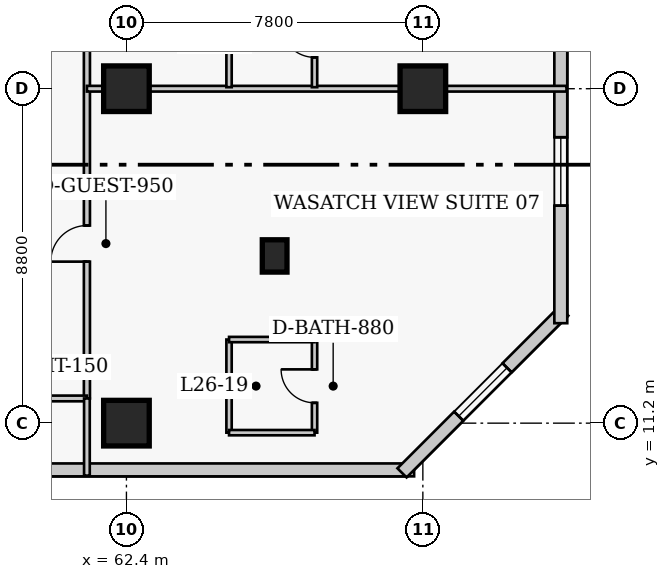
"""IFC4 building model, lengths in metres.
Left out: names, types, materials, properties, quantities, classifications, styles, units other than length and angle.
Written with IfcOpenShell. Run it as: python <this file> out.ifc"""

import sys

from ifc_helpers import new_model, si_unit, direction, frame, frame_2d, origin, origin_2d, place, context, subcontext, project, spatial, rectangle, extrude, element, fill, save


model = new_model("IFC4")
c1 = context("Model", 3, precision=1e-05, world=origin(), true_north=direction((0.0, 1.0)))
c2 = subcontext(c1, "Body", "Model", "MODEL_VIEW")
j1 = project(units=[si_unit("LENGTHUNIT", "METRE"), si_unit("PLANEANGLEUNIT", "RADIAN")], contexts=[c1])
p1 = place(None, origin())
s1 = spatial("IfcSite", under=j1, at=p1, CompositionType="ELEMENT")
p2 = place(p1, origin())
s2 = spatial("IfcBuilding", under=s1, at=p2, CompositionType="ELEMENT")
p3 = place(p2, frame((0.0, 0.0, 107.0)))
s3 = spatial("IfcBuildingStorey", under=s2, at=p3, CompositionType="ELEMENT", Elevation=107.0)
for number, where, z_axis, x_axis in (
    (1, (62.4, 11.2, 0.0), (0.0, 0.0, 1.0), (1.0, 0.0, 0.0)),
    (2, (62.4, 20.0, 0.0), (0.0, 0.0, 1.0), (1.0, 0.0, 0.0)),
    (3, (70.2, 20.0, 0.0), (0.0, 0.0, 1.0), (1.0, 0.0, 0.0)),
):
    element("IfcColumn", number, at=place(p3, frame(where, z_axis=z_axis, x_axis=x_axis)), inside=s3, PredefinedType="COLUMN", context=c2, shape_type="SweptSolid", body=[
        extrude(rectangle(XDim=1.2, YDim=1.2, at=origin_2d()), origin(), (0.0, 0.0, 1.0), 3.8),
    ])
p4 = place(p3, frame((66.3, 15.6, 0.0), z_axis=(0.0, 0.0, 1.0), x_axis=(1.0, 0.0, 0.0)))
e4 = element("IfcColumn", 4, at=p4, inside=s3, PredefinedType="PILASTER", context=c2, shape_type="SweptSolid", body=[
    extrude(rectangle(XDim=0.65, YDim=0.85, at=origin_2d()), origin(), (0.0, 0.0, 1.0), 3.8),
])
p5 = place(p3, frame((41.68, 9.97, 0.0), z_axis=(0.0, 0.0, 1.0), x_axis=(1.0, 0.0, 0.0)))
e5 = element("IfcWall", 5, at=p5, inside=s3, PredefinedType="SOLIDWALL", context=c2, shape_type="SweptSolid", body=[
    extrude(rectangle(XDim=28.29, YDim=0.34, at=frame_2d((14.145, 0.0))), origin(), (0.0, 0.0, 1.0), 3.54),
])
p6 = place(p5, frame((8.32, 0.0, 0.0)))
e6 = element("IfcOpeningElement", 6, at=p6, cuts=e5, PredefinedType="OPENING", context=c2, shape_type="SweptSolid", body=[
    extrude(rectangle(XDim=1.4, YDim=2.15, at=frame_2d((0.7, 1.075))), frame((0.0, 0.18, 0.0), z_axis=(0.0, -1.0, 0.0), x_axis=(1.0, 0.0, 0.0)), (0.0, 0.0, 1.0), 0.36),
])
p7 = place(p5, frame((2.665, 0.0, 0.85)))
e7 = element("IfcOpeningElement", 7, at=p7, cuts=e5, PredefinedType="OPENING", context=c2, shape_type="SweptSolid", body=[
    extrude(rectangle(XDim=1.8, YDim=1.8, at=frame_2d((0.9, 0.9))), frame((0.0, 0.18, 0.0), z_axis=(0.0, -1.0, 0.0), x_axis=(1.0, 0.0, 0.0)), (0.0, 0.0, 1.0), 0.36),
])
p8 = place(p5, frame((13.895, 0.0, 0.85)))
e8 = element("IfcOpeningElement", 8, at=p8, cuts=e5, PredefinedType="OPENING", context=c2, shape_type="SweptSolid", body=[
    extrude(rectangle(XDim=1.8, YDim=1.8, at=frame_2d((0.9, 0.9))), frame((0.0, 0.18, 0.0), z_axis=(0.0, -1.0, 0.0), x_axis=(1.0, 0.0, 0.0)), (0.0, 0.0, 1.0), 0.36),
])
p9 = place(p3, frame((69.652, 9.892, 0.0), z_axis=(0.0, 0.0, 1.0), x_axis=(0.707106781187, 0.707106781187, 0.0)))
e9 = element("IfcWall", 9, at=p9, inside=s3, PredefinedType="SOLIDWALL", context=c2, shape_type="SweptSolid", body=[
    extrude(rectangle(XDim=6.02, YDim=0.34, at=frame_2d((3.01, 0.0))), origin(), (0.0, 0.0, 1.0), 3.54),
])
p10 = place(p9, frame((2.11, 0.0, 0.85)))
e10 = element("IfcOpeningElement", 10, at=p10, cuts=e9, PredefinedType="OPENING", context=c2, shape_type="SweptSolid", body=[
    extrude(rectangle(XDim=1.8, YDim=1.8, at=frame_2d((0.9, 0.9))), frame((0.0, 0.18, 0.0), z_axis=(0.0, -1.0, 0.0), x_axis=(1.0, 0.0, 0.0)), (0.0, 0.0, 1.0), 0.36),
])
p11 = place(p3, frame((73.83, 13.83, 0.0), z_axis=(0.0, 0.0, 1.0), x_axis=(0.0, 1.0, 0.0)))
e11 = element("IfcWall", 11, at=p11, inside=s3, PredefinedType="SOLIDWALL", context=c2, shape_type="SweptSolid", body=[
    extrude(rectangle(XDim=31.94, YDim=0.34, at=frame_2d((15.97, 0.0))), origin(), (0.0, 0.0, 1.0), 3.54),
])
p12 = place(p11, frame((3.093, 0.0, 0.85)))
e12 = element("IfcOpeningElement", 12, at=p12, cuts=e11, PredefinedType="OPENING", context=c2, shape_type="SweptSolid", body=[
    extrude(rectangle(XDim=1.8, YDim=1.8, at=frame_2d((0.9, 0.9))), frame((0.0, 0.18, 0.0), z_axis=(0.0, -1.0, 0.0), x_axis=(1.0, 0.0, 0.0)), (0.0, 0.0, 1.0), 0.36),
])
p13 = place(p11, frame((11.077, 0.0, 0.85)))
e13 = element("IfcOpeningElement", 13, at=p13, cuts=e11, PredefinedType="OPENING", context=c2, shape_type="SweptSolid", body=[
    extrude(rectangle(XDim=1.8, YDim=1.8, at=frame_2d((0.9, 0.9))), frame((0.0, 0.18, 0.0), z_axis=(0.0, -1.0, 0.0), x_axis=(1.0, 0.0, 0.0)), (0.0, 0.0, 1.0), 0.36),
])
p14 = place(p11, frame((19.062, 0.0, 0.85)))
e14 = element("IfcOpeningElement", 14, at=p14, cuts=e11, PredefinedType="OPENING", context=c2, shape_type="SweptSolid", body=[
    extrude(rectangle(XDim=1.8, YDim=1.8, at=frame_2d((0.9, 0.9))), frame((0.0, 0.18, 0.0), z_axis=(0.0, -1.0, 0.0), x_axis=(1.0, 0.0, 0.0)), (0.0, 0.0, 1.0), 0.36),
])
p15 = place(p11, frame((27.048, 0.0, 0.85)))
e15 = element("IfcOpeningElement", 15, at=p15, cuts=e11, PredefinedType="OPENING", context=c2, shape_type="SweptSolid", body=[
    extrude(rectangle(XDim=1.8, YDim=1.8, at=frame_2d((0.9, 0.9))), frame((0.0, 0.18, 0.0), z_axis=(0.0, -1.0, 0.0), x_axis=(1.0, 0.0, 0.0)), (0.0, 0.0, 1.0), 0.36),
])
p16 = place(p3, frame((61.36, 11.85, 0.0), z_axis=(0.0, 0.0, 1.0), x_axis=(0.0, 1.0, 0.0)))
e16 = element("IfcWall", 16, at=p16, inside=s3, PredefinedType="PARTITIONING", context=c2, shape_type="SweptSolid", body=[
    extrude(rectangle(XDim=28.8, YDim=0.16, at=frame_2d((14.4, 0.0))), origin(), (0.0, 0.0, 1.0), 3.54),
])
p17 = place(p16, frame((3.6, 0.0, 0.0)))
e17 = element("IfcOpeningElement", 17, at=p17, cuts=e16, PredefinedType="OPENING", context=c2, shape_type="SweptSolid", body=[
    extrude(rectangle(XDim=0.95, YDim=2.1, at=frame_2d((0.475, 1.05))), frame((0.0, 0.09, 0.0), z_axis=(0.0, -1.0, 0.0), x_axis=(1.0, 0.0, 0.0)), (0.0, 0.0, 1.0), 0.18),
])
p18 = place(p16, frame((12.075, 0.0, 0.0)))
e18 = element("IfcOpeningElement", 18, at=p18, cuts=e16, PredefinedType="OPENING", context=c2, shape_type="SweptSolid", body=[
    extrude(rectangle(XDim=0.95, YDim=2.1, at=frame_2d((0.475, 1.05))), frame((0.0, 0.09, 0.0), z_axis=(0.0, -1.0, 0.0), x_axis=(1.0, 0.0, 0.0)), (0.0, 0.0, 1.0), 0.18),
])
p19 = place(p16, frame((19.875, 0.0, 0.0)))
e19 = element("IfcOpeningElement", 19, at=p19, cuts=e16, PredefinedType="OPENING", context=c2, shape_type="SweptSolid", body=[
    extrude(rectangle(XDim=0.95, YDim=2.1, at=frame_2d((0.475, 1.05))), frame((0.0, 0.09, 0.0), z_axis=(0.0, -1.0, 0.0), x_axis=(1.0, 0.0, 0.0)), (0.0, 0.0, 1.0), 0.18),
])
p20 = place(p16, frame((24.3, 0.0, 0.0)))
e20 = element("IfcOpeningElement", 20, at=p20, cuts=e16, PredefinedType="OPENING", context=c2, shape_type="SweptSolid", body=[
    extrude(rectangle(XDim=1.0, YDim=2.15, at=frame_2d((0.5, 1.075))), frame((0.0, 0.09, 0.0), z_axis=(0.0, -1.0, 0.0), x_axis=(1.0, 0.0, 0.0)), (0.0, 0.0, 1.0), 0.18),
])
p21 = place(p3, frame((59.14, 11.85, 0.0), z_axis=(0.0, 0.0, 1.0), x_axis=(1.0, 0.0, 0.0)))
e21 = element("IfcWall", 21, at=p21, inside=s3, PredefinedType="PARTITIONING", context=c2, shape_type="SweptSolid", body=[
    extrude(rectangle(XDim=2.22, YDim=0.15, at=frame_2d((1.11, 0.0))), origin(), (0.0, 0.0, 1.0), 3.54),
])
p22 = place(p3, frame((61.36, 9.82, 0.0), z_axis=(0.0, 0.0, 1.0), x_axis=(0.0, 1.0, 0.0)))
e22 = element("IfcWall", 22, at=p22, inside=s3, PredefinedType="PARTITIONING", context=c2, shape_type="SweptSolid", body=[
    extrude(rectangle(XDim=2.03, YDim=0.15, at=frame_2d((1.015, 0.0))), origin(), (0.0, 0.0, 1.0), 3.54),
])
p23 = place(p3, frame((65.1, 10.95, 0.0), z_axis=(0.0, 0.0, 1.0), x_axis=(0.0, 1.0, 0.0)))
e23 = element("IfcWall", 23, at=p23, inside=s3, PredefinedType="PLUMBINGWALL", context=c2, shape_type="SweptSolid", body=[
    extrude(rectangle(XDim=2.45, YDim=0.14, at=frame_2d((1.225, 0.0))), origin(), (0.0, 0.0, 1.0), 3.54),
])
p24 = place(p3, frame((67.35, 10.95, 0.0), z_axis=(0.0, 0.0, 1.0), x_axis=(0.0, 1.0, 0.0)))
e24 = element("IfcWall", 24, at=p24, inside=s3, PredefinedType="PLUMBINGWALL", context=c2, shape_type="SweptSolid", body=[
    extrude(rectangle(XDim=2.45, YDim=0.14, at=frame_2d((1.225, 0.0))), origin(), (0.0, 0.0, 1.0), 3.54),
])
p25 = place(p24, frame((0.785, 0.0, 0.0)))
e25 = element("IfcOpeningElement", 25, at=p25, cuts=e24, PredefinedType="OPENING", context=c2, shape_type="SweptSolid", body=[
    extrude(rectangle(XDim=0.88, YDim=2.05, at=frame_2d((0.44, 1.025))), frame((0.0, 0.08, 0.0), z_axis=(0.0, -1.0, 0.0), x_axis=(1.0, 0.0, 0.0)), (0.0, 0.0, 1.0), 0.16),
])
for number, where, z_axis, x_axis in (
    (26, (65.1, 10.95, 0.0), (0.0, 0.0, 1.0), (1.0, 0.0, 0.0)),
    (27, (65.1, 13.4, 0.0), (0.0, 0.0, 1.0), (1.0, 0.0, 0.0)),
):
    element("IfcWall", number, at=place(p3, frame(where, z_axis=z_axis, x_axis=x_axis)), inside=s3, PredefinedType="PLUMBINGWALL", context=c2, shape_type="SweptSolid", body=[
        extrude(rectangle(XDim=2.25, YDim=0.14, at=frame_2d((1.125, 0.0))), origin(), (0.0, 0.0, 1.0), 3.54),
    ])
p26 = place(p3, frame((61.36, 20.0, 0.0), z_axis=(0.0, 0.0, 1.0), x_axis=(1.0, 0.0, 0.0)))
e28 = element("IfcWall", 28, at=p26, inside=s3, PredefinedType="PARTITIONING", context=c2, shape_type="SweptSolid", body=[
    extrude(rectangle(XDim=12.62, YDim=0.15, at=frame_2d((6.31, 0.0))), origin(), (0.0, 0.0, 1.0), 2.679),
])
p27 = place(p3, frame((65.1, 20.04, 0.0), z_axis=(0.0, 0.0, 1.0), x_axis=(0.0, 1.0, 0.0)))
e29 = element("IfcWall", 29, at=p27, inside=s3, PredefinedType="PLUMBINGWALL", context=c2, shape_type="SweptSolid", body=[
    extrude(rectangle(XDim=2.45, YDim=0.14, at=frame_2d((1.225, 0.0))), origin(), (0.0, 0.0, 1.0), 3.54),
])
p28 = place(p3, frame((67.35, 20.04, 0.0), z_axis=(0.0, 0.0, 1.0), x_axis=(0.0, 1.0, 0.0)))
e30 = element("IfcWall", 30, at=p28, inside=s3, PredefinedType="PLUMBINGWALL", context=c2, shape_type="SweptSolid", body=[
    extrude(rectangle(XDim=2.45, YDim=0.14, at=frame_2d((1.225, 0.0))), origin(), (0.0, 0.0, 1.0), 3.54),
])
p29 = place(p28, frame((0.785, 0.0, 0.0)))
e31 = element("IfcOpeningElement", 31, at=p29, cuts=e30, PredefinedType="OPENING", context=c2, shape_type="SweptSolid", body=[
    extrude(rectangle(XDim=0.88, YDim=2.05, at=frame_2d((0.44, 1.025))), frame((0.0, 0.08, 0.0), z_axis=(0.0, -1.0, 0.0), x_axis=(1.0, 0.0, 0.0)), (0.0, 0.0, 1.0), 0.16),
])
p30 = place(p10, origin())
e32 = element("IfcWindow", 32, at=p30, inside=s3, PartitioningType="SINGLE_PANEL", PredefinedType="WINDOW", context=c2, shape_type="SweptSolid", body=[
    extrude(rectangle(XDim=1.8, YDim=1.8, at=frame_2d((0.9, 0.9))), frame((0.0, 0.03, 0.0), z_axis=(0.0, -1.0, 0.0), x_axis=(1.0, 0.0, 0.0)), (0.0, 0.0, 1.0), 0.06),
])
fill(e10, e32)
p31 = place(p12, origin())
e33 = element("IfcWindow", 33, at=p31, inside=s3, PartitioningType="SINGLE_PANEL", PredefinedType="WINDOW", context=c2, shape_type="SweptSolid", body=[
    extrude(rectangle(XDim=1.8, YDim=1.8, at=frame_2d((0.9, 0.9))), frame((0.0, 0.03, 0.0), z_axis=(0.0, -1.0, 0.0), x_axis=(1.0, 0.0, 0.0)), (0.0, 0.0, 1.0), 0.06),
])
fill(e12, e33)
p32 = place(p25, origin())
e34 = element("IfcDoor", 34, at=p32, inside=s3, OperationType="SINGLE_SWING_RIGHT", PredefinedType="DOOR", context=c2, shape_type="SweptSolid", body=[
    extrude(rectangle(XDim=0.88, YDim=2.05, at=frame_2d((0.44, 1.025))), frame((0.0, 0.025, 0.0), z_axis=(0.0, -1.0, 0.0), x_axis=(1.0, 0.0, 0.0)), (0.0, 0.0, 1.0), 0.05),
])
fill(e25, e34)
p33 = place(p17, origin())
e35 = element("IfcDoor", 35, at=p33, inside=s3, OperationType="SINGLE_SWING_LEFT", PredefinedType="DOOR", context=c2, shape_type="SweptSolid", body=[
    extrude(rectangle(XDim=0.95, YDim=2.1, at=frame_2d((0.475, 1.05))), frame((0.0, 0.025, 0.0), z_axis=(0.0, -1.0, 0.0), x_axis=(1.0, 0.0, 0.0)), (0.0, 0.0, 1.0), 0.05),
])
fill(e17, e35)
p34 = place(p29, origin())
e36 = element("IfcDoor", 36, at=p34, inside=s3, OperationType="SINGLE_SWING_RIGHT", PredefinedType="DOOR", context=c2, shape_type="SweptSolid", body=[
    extrude(rectangle(XDim=0.88, YDim=2.05, at=frame_2d((0.44, 1.025))), frame((0.0, 0.025, 0.0), z_axis=(0.0, -1.0, 0.0), x_axis=(1.0, 0.0, 0.0)), (0.0, 0.0, 1.0), 0.05),
])
fill(e31, e36)
save(model, sys.argv[1])
